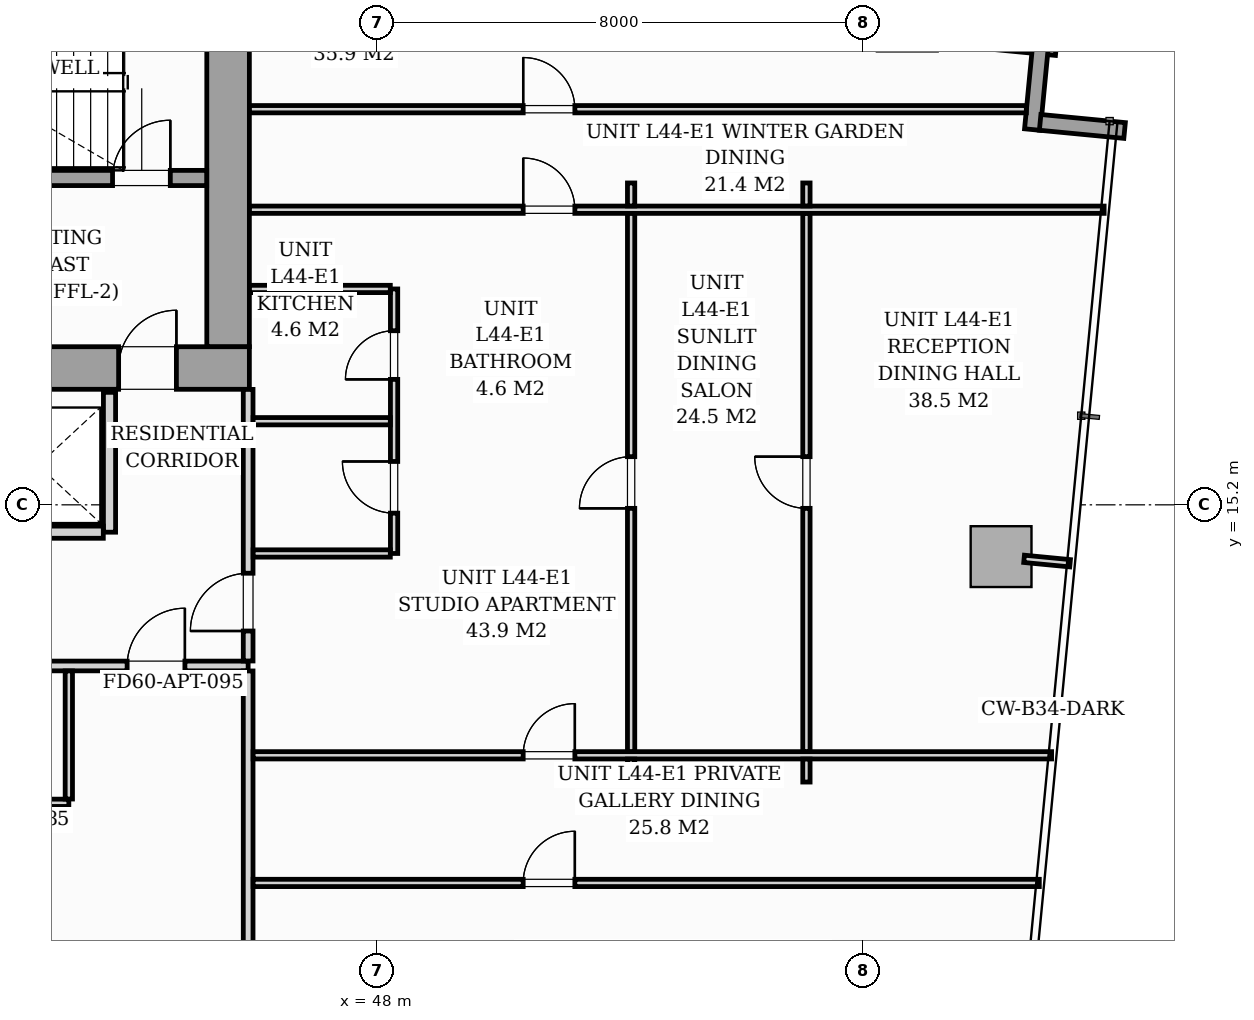
"""IFC4 building model, lengths in metres.
Left out: names, types, materials, properties, quantities, classifications, styles, units other than length and angle.
Written with IfcOpenShell. Run it as: python <this file> out.ifc"""

import sys

from ifc_helpers import new_model, si_unit, direction, frame, frame_2d, origin, origin_2d, place, context, subcontext, project, spatial, rectangle, i_section, extrude, source, transform, mapped, element, fill, save


model = new_model("IFC4")
c1 = context("Model", 3, precision=1e-05, world=origin(), true_north=direction((0.0, 1.0)))
c2 = subcontext(c1, "Body", "Model", "MODEL_VIEW")
j1 = project(units=[si_unit("LENGTHUNIT", "METRE"), si_unit("PLANEANGLEUNIT", "RADIAN")], contexts=[c1])
p1 = place(None, origin())
s1 = spatial("IfcSite", under=j1, at=p1, CompositionType="ELEMENT")
p2 = place(p1, origin())
s2 = spatial("IfcBuilding", under=s1, at=p2, CompositionType="ELEMENT")
p3 = place(p2, frame((0.0, 0.0, 153.4)))
s3 = spatial("IfcBuildingStorey", under=s2, at=p3, CompositionType="ELEMENT", Elevation=153.4)
m1 = source(origin(), c2, "Body", "SweptSolid", [
    extrude(i_section(OverallWidth=0.421, OverallDepth=0.465, WebThickness=0.045, FlangeThickness=0.073, FilletRadius=0.018, at=origin_2d()), origin(), (0.0, 0.0, 1.0), 3.196),
])
p4 = place(p3, frame((45.6, 17.4, 0.002), z_axis=(0.0, 0.0, 1.0), x_axis=(1.0, 0.0, 0.0)))
e1 = element("IfcColumn", 1, at=p4, inside=s3, PredefinedType="PILASTER", context=c2, shape_type="MappedRepresentation", body=[
    mapped(m1, transform((0.0, 0.0, 0.0), scale=1.0)),
])
m2 = source(origin(), c2, "Body", "SweptSolid", [
    extrude(rectangle(XDim=1.0, YDim=1.0, at=origin_2d()), origin(), (0.0, 0.0, 1.0), 3.196),
])
for number, where, z_axis, x_axis in (
    (2, (56.719, 23.157, 0.002), (0.0, 0.0, 1.0), (0.995, -0.096, 0.0)),
    (3, (58.262, 14.348, 0.002), (0.0, 0.0, 1.0), (0.995, -0.096, 0.0)),
):
    element("IfcColumn", number, at=place(p3, frame(where, z_axis=z_axis, x_axis=x_axis)), inside=s3, PredefinedType="COLUMN", context=c2, shape_type="MappedRepresentation", body=[
        mapped(m2, transform((0.0, 0.0, 0.0), scale=1.0)),
    ])
p5 = place(p3, frame((57.2, 22.909, 0.0), z_axis=(0.0, 0.0, 1.0), x_axis=(0.995401789159, -0.095787672171, 0.0)))
e4 = element("IfcWall", 4, at=p5, inside=s3, PredefinedType="STANDARD", context=c2, shape_type="SweptSolid", body=[
    extrude(rectangle(XDim=1.978, YDim=0.26, at=frame_2d((0.989, 0.0))), origin(), (0.0, 0.0, 1.0), 2.94),
])
for number, where, z_axis, x_axis in (
    (5, (58.912, 22.76, 0.0), (0.0, 0.0, 1.0), (-0.096, -0.995, 0.0)),
    (6, (58.905, 21.49, 0.0), (0.0, 0.0, 1.0), (0.995, -0.096, 0.0)),
):
    element("IfcWall", number, at=place(p3, frame(where, z_axis=z_axis, x_axis=x_axis)), inside=s3, PredefinedType="STANDARD", context=c2, shape_type="SweptSolid", body=[
        extrude(rectangle(XDim=1.395, YDim=0.26, at=frame_2d((0.698, 0.0))), origin(), (0.0, 0.0, 1.0), 2.94),
    ])
p6 = place(p3, frame((26.1, 17.45, 0.0), z_axis=(0.0, 0.0, 1.0), x_axis=(1.0, 0.0, 0.0)))
e7 = element("IfcWall", 7, at=p6, inside=s3, PredefinedType="SHEAR", context=c2, shape_type="SweptSolid", body=[
    extrude(rectangle(XDim=19.8, YDim=0.7, at=frame_2d((9.9, 0.0))), origin(), (0.0, 0.0, 1.0), 3.2),
])
p7 = place(p6, frame((1.05, 0.0, 0.0)))
e8 = element("IfcOpeningElement", 8, at=p7, cuts=e7, PredefinedType="OPENING", context=c2, shape_type="SweptSolid", body=[
    extrude(rectangle(XDim=0.95, YDim=2.06, at=frame_2d((0.475, 1.03))), frame((0.0, 0.36, 0.0), z_axis=(0.0, -1.0, 0.0), x_axis=(1.0, 0.0, 0.0)), (0.0, 0.0, 1.0), 0.72),
])
p8 = place(p6, frame((9.48, 0.0, 0.0)))
e9 = element("IfcOpeningElement", 9, at=p8, cuts=e7, PredefinedType="OPENING", context=c2, shape_type="SweptSolid", body=[
    extrude(rectangle(XDim=0.85, YDim=2.0, at=frame_2d((0.425, 1.0))), frame((0.0, 0.36, 0.0), z_axis=(0.0, -1.0, 0.0), x_axis=(1.0, 0.0, 0.0)), (0.0, 0.0, 1.0), 0.72),
])
p9 = place(p6, frame((17.65, 0.0, 0.0)))
e10 = element("IfcOpeningElement", 10, at=p9, cuts=e7, PredefinedType="OPENING", context=c2, shape_type="SweptSolid", body=[
    extrude(rectangle(XDim=0.95, YDim=2.06, at=frame_2d((0.475, 1.03))), frame((0.0, 0.36, 0.0), z_axis=(0.0, -1.0, 0.0), x_axis=(1.0, 0.0, 0.0)), (0.0, 0.0, 1.0), 0.72),
])
p10 = place(p3, frame((45.55, 17.802, 0.0), z_axis=(0.0, 0.0, 1.0), x_axis=(0.0, 1.0, 0.0)))
e11 = element("IfcWall", 11, at=p10, inside=s3, PredefinedType="SHEAR", context=c2, shape_type="SweptSolid", body=[
    extrude(rectangle(XDim=5.796, YDim=0.7, at=frame_2d((2.898, 0.0))), origin(), (0.0, 0.0, 1.0), 3.2),
])
p11 = place(p3, frame((37.05, 20.575, 0.0), z_axis=(0.0, 0.0, 1.0), x_axis=(1.0, 0.0, 0.0)))
e12 = element("IfcWall", 12, at=p11, inside=s3, PredefinedType="SOLIDWALL", context=c2, shape_type="SweptSolid", body=[
    extrude(rectangle(XDim=8.148, YDim=0.25, at=frame_2d((4.074, 0.0))), origin(), (0.0, 0.0, 1.0), 3.2),
])
p12 = place(p11, frame((6.6, 0.0, 0.0)))
e13 = element("IfcOpeningElement", 13, at=p12, cuts=e12, PredefinedType="OPENING", context=c2, shape_type="SweptSolid", body=[
    extrude(rectangle(XDim=0.95, YDim=2.06, at=frame_2d((0.475, 1.03))), frame((0.0, 0.135, 0.0), z_axis=(0.0, -1.0, 0.0), x_axis=(1.0, 0.0, 0.0)), (0.0, 0.0, 1.0), 0.27),
])
p13 = place(p3, frame((43.6, 14.75, 0.0), z_axis=(0.0, 0.0, 1.0), x_axis=(0.0, 1.0, 0.0)))
e14 = element("IfcWall", 14, at=p13, inside=s3, PredefinedType="PARTITIONING", context=c2, shape_type="SweptSolid", body=[
    extrude(rectangle(XDim=2.3, YDim=0.2, at=frame_2d((1.15, 0.0))), origin(), (0.0, 0.0, 1.0), 2.94),
])
p14 = place(p3, frame((41.352, 14.75, 0.0), z_axis=(0.0, 0.0, 1.0), x_axis=(1.0, 0.0, 0.0)))
e15 = element("IfcWall", 15, at=p14, inside=s3, PredefinedType="PARTITIONING", context=c2, shape_type="SweptSolid", body=[
    extrude(rectangle(XDim=2.146, YDim=0.2, at=frame_2d((1.073, 0.0))), origin(), (0.0, 0.0, 1.0), 2.94),
])
p15 = place(p3, frame((22.05, 12.55, 0.0), z_axis=(0.0, 0.0, 1.0), x_axis=(1.0, 0.0, 0.0)))
e16 = element("IfcWall", 16, at=p15, inside=s3, PredefinedType="PARTITIONING", context=c2, shape_type="SweptSolid", body=[
    extrude(rectangle(XDim=23.83, YDim=0.16, at=frame_2d((11.915, 0.0))), origin(), (0.0, 0.0, 1.0), 2.94),
])
p16 = place(p15, frame((1.873, 0.0, 0.0)))
e17 = element("IfcOpeningElement", 17, at=p16, cuts=e16, PredefinedType="OPENING", context=c2, shape_type="SweptSolid", body=[
    extrude(rectangle(XDim=0.95, YDim=2.06, at=frame_2d((0.475, 1.03))), frame((0.0, 0.09, 0.0), z_axis=(0.0, -1.0, 0.0), x_axis=(1.0, 0.0, 0.0)), (0.0, 0.0, 1.0), 0.18),
])
p17 = place(p15, frame((10.224, 0.0, 0.0)))
e18 = element("IfcOpeningElement", 18, at=p17, cuts=e16, PredefinedType="OPENING", context=c2, shape_type="SweptSolid", body=[
    extrude(rectangle(XDim=0.95, YDim=2.06, at=frame_2d((0.475, 1.03))), frame((0.0, 0.09, 0.0), z_axis=(0.0, -1.0, 0.0), x_axis=(1.0, 0.0, 0.0)), (0.0, 0.0, 1.0), 0.18),
])
p18 = place(p15, frame((21.84, 0.0, 0.0)))
e19 = element("IfcOpeningElement", 19, at=p18, cuts=e16, PredefinedType="OPENING", context=c2, shape_type="SweptSolid", body=[
    extrude(rectangle(XDim=0.95, YDim=2.06, at=frame_2d((0.475, 1.03))), frame((0.0, 0.09, 0.0), z_axis=(0.0, -1.0, 0.0), x_axis=(1.0, 0.0, 0.0)), (0.0, 0.0, 1.0), 0.18),
])
p19 = place(p3, frame((45.88, 5.958, 0.0), z_axis=(0.0, 0.0, 1.0), x_axis=(0.0, 1.0, 0.0)))
e20 = element("IfcWall", 20, at=p19, inside=s3, PredefinedType="PARTITIONING", context=c2, shape_type="SweptSolid", body=[
    extrude(rectangle(XDim=6.51, YDim=0.16, at=frame_2d((3.255, 0.0))), origin(), (0.0, 0.0, 1.0), 2.94),
])
p20 = place(p3, frame((45.88, 12.632, 0.0), z_axis=(0.0, 0.0, 1.0), x_axis=(0.0, 1.0, 0.0)))
e21 = element("IfcWall", 21, at=p20, inside=s3, PredefinedType="PARTITIONING", context=c2, shape_type="SweptSolid", body=[
    extrude(rectangle(XDim=4.466, YDim=0.16, at=frame_2d((2.233, 0.0))), origin(), (0.0, 0.0, 1.0), 2.94),
])
p21 = place(p20, frame((0.493, 0.0, 0.0)))
e22 = element("IfcOpeningElement", 22, at=p21, cuts=e21, PredefinedType="OPENING", context=c2, shape_type="SweptSolid", body=[
    extrude(rectangle(XDim=0.95, YDim=2.06, at=frame_2d((0.475, 1.03))), frame((0.0, 0.09, 0.0), z_axis=(0.0, -1.0, 0.0), x_axis=(1.0, 0.0, 0.0)), (0.0, 0.0, 1.0), 0.18),
])
p22 = place(p3, frame((38.931, 10.3, 0.0), z_axis=(0.0, 0.0, 1.0), x_axis=(1.0, 0.0, 0.0)))
e23 = element("IfcWall", 23, at=p22, inside=s3, PredefinedType="PARTITIONING", context=c2, shape_type="SweptSolid", body=[
    extrude(rectangle(XDim=4.0, YDim=0.12, at=frame_2d((2.0, 0.0))), origin(), (0.0, 0.0, 1.0), 2.94),
])
p23 = place(p22, frame((0.45, 0.0, 0.0)))
e24 = element("IfcOpeningElement", 24, at=p23, cuts=e23, PredefinedType="OPENING", context=c2, shape_type="SweptSolid", body=[
    extrude(rectangle(XDim=0.8, YDim=2.02, at=frame_2d((0.4, 1.01))), frame((0.0, 0.07, 0.0), z_axis=(0.0, -1.0, 0.0), x_axis=(1.0, 0.0, 0.0)), (0.0, 0.0, 1.0), 0.14),
])
p24 = place(p22, frame((2.475, 0.0, 0.0)))
e25 = element("IfcOpeningElement", 25, at=p24, cuts=e23, PredefinedType="OPENING", context=c2, shape_type="SweptSolid", body=[
    extrude(rectangle(XDim=0.85, YDim=2.05, at=frame_2d((0.425, 1.025))), frame((0.0, 0.07, 0.0), z_axis=(0.0, -1.0, 0.0), x_axis=(1.0, 0.0, 0.0)), (0.0, 0.0, 1.0), 0.14),
])
p25 = place(p3, frame((42.931, 10.362, 0.0), z_axis=(0.0, 0.0, 1.0), x_axis=(0.0, 1.0, 0.0)))
e26 = element("IfcWall", 26, at=p25, inside=s3, PredefinedType="PARTITIONING", context=c2, shape_type="SweptSolid", body=[
    extrude(rectangle(XDim=2.106, YDim=0.12, at=frame_2d((1.053, 0.0))), origin(), (0.0, 0.0, 1.0), 2.94),
])
p26 = place(p3, frame((48.28, 14.4, 0.0), z_axis=(0.0, 0.0, 1.0), x_axis=(0.0, 1.0, 0.0)))
e27 = element("IfcWall", 27, at=p26, inside=s3, PredefinedType="PARTITIONING", context=c2, shape_type="SweptSolid", body=[
    extrude(rectangle(XDim=4.35, YDim=0.12, at=frame_2d((2.175, 0.0))), origin(), (0.0, 0.0, 1.0), 2.94),
])
p27 = place(p26, frame((0.663, 0.0, 0.0)))
e28 = element("IfcOpeningElement", 28, at=p27, cuts=e27, PredefinedType="OPENING", context=c2, shape_type="SweptSolid", body=[
    extrude(rectangle(XDim=0.85, YDim=2.05, at=frame_2d((0.425, 1.025))), frame((0.0, 0.07, 0.0), z_axis=(0.0, -1.0, 0.0), x_axis=(1.0, 0.0, 0.0)), (0.0, 0.0, 1.0), 0.14),
])
p28 = place(p26, frame((2.863, 0.0, 0.0)))
e29 = element("IfcOpeningElement", 29, at=p28, cuts=e27, PredefinedType="OPENING", context=c2, shape_type="SweptSolid", body=[
    extrude(rectangle(XDim=0.8, YDim=2.02, at=frame_2d((0.4, 1.01))), frame((0.0, 0.07, 0.0), z_axis=(0.0, -1.0, 0.0), x_axis=(1.0, 0.0, 0.0)), (0.0, 0.0, 1.0), 0.14),
])
for number, where, z_axis, x_axis in (
    (30, (45.962, 16.575, 0.0), (0.0, 0.0, 1.0), (1.0, 0.0, 0.0)),
    (31, (45.962, 14.4, 0.0), (0.0, 0.0, 1.0), (1.0, 0.0, 0.0)),
):
    element("IfcWall", number, at=place(p3, frame(where, z_axis=z_axis, x_axis=x_axis)), inside=s3, PredefinedType="PARTITIONING", context=c2, shape_type="SweptSolid", body=[
        extrude(rectangle(XDim=2.256, YDim=0.12, at=frame_2d((1.128, 0.0))), origin(), (0.0, 0.0, 1.0), 2.94),
    ])
p29 = place(p3, frame((45.902, 18.75, 0.0), z_axis=(0.0, 0.0, 1.0), x_axis=(1.0, 0.0, 0.0)))
e32 = element("IfcWall", 32, at=p29, inside=s3, PredefinedType="PARTITIONING", context=c2, shape_type="SweptSolid", body=[
    extrude(rectangle(XDim=2.316, YDim=0.12, at=frame_2d((1.158, 0.0))), origin(), (0.0, 0.0, 1.0), 2.94),
])
p30 = place(p3, frame((45.962, 8.982, 0.0), z_axis=(0.0, 0.0, 1.0), x_axis=(1.0, 0.0, 0.0)))
e33 = element("IfcWall", 33, at=p30, inside=s3, PredefinedType="PARTITIONING", context=c2, shape_type="SweptSolid", body=[
    extrude(rectangle(XDim=12.929, YDim=0.12, at=frame_2d((6.464, 0.0))), origin(), (0.0, 0.0, 1.0), 2.94),
])
p31 = place(p30, frame((4.441, 0.0, 0.0)))
e34 = element("IfcOpeningElement", 34, at=p31, cuts=e33, PredefinedType="OPENING", context=c2, shape_type="SweptSolid", body=[
    extrude(rectangle(XDim=0.85, YDim=2.05, at=frame_2d((0.425, 1.025))), frame((0.0, 0.07, 0.0), z_axis=(0.0, -1.0, 0.0), x_axis=(1.0, 0.0, 0.0)), (0.0, 0.0, 1.0), 0.14),
])
p32 = place(p3, frame((45.902, 21.706, 0.0), z_axis=(0.0, 0.0, 1.0), x_axis=(1.0, 0.0, 0.0)))
e35 = element("IfcWall", 35, at=p32, inside=s3, PredefinedType="PARTITIONING", context=c2, shape_type="SweptSolid", body=[
    extrude(rectangle(XDim=12.775, YDim=0.12, at=frame_2d((6.388, 0.0))), origin(), (0.0, 0.0, 1.0), 2.94),
])
p33 = place(p32, frame((4.501, 0.0, 0.0)))
e36 = element("IfcOpeningElement", 36, at=p33, cuts=e35, PredefinedType="OPENING", context=c2, shape_type="SweptSolid", body=[
    extrude(rectangle(XDim=0.85, YDim=2.05, at=frame_2d((0.425, 1.025))), frame((0.0, 0.07, 0.0), z_axis=(0.0, -1.0, 0.0), x_axis=(1.0, 0.0, 0.0)), (0.0, 0.0, 1.0), 0.14),
])
p34 = place(p3, frame((45.962, 11.081, 0.0), z_axis=(0.0, 0.0, 1.0), x_axis=(1.0, 0.0, 0.0)))
e37 = element("IfcWall", 37, at=p34, inside=s3, PredefinedType="PARTITIONING", context=c2, shape_type="SweptSolid", body=[
    extrude(rectangle(XDim=13.131, YDim=0.12, at=frame_2d((6.565, 0.0))), origin(), (0.0, 0.0, 1.0), 2.94),
])
p35 = place(p34, frame((4.441, 0.0, 0.0)))
e38 = element("IfcOpeningElement", 38, at=p35, cuts=e37, PredefinedType="OPENING", context=c2, shape_type="SweptSolid", body=[
    extrude(rectangle(XDim=0.85, YDim=2.05, at=frame_2d((0.425, 1.025))), frame((0.0, 0.07, 0.0), z_axis=(0.0, -1.0, 0.0), x_axis=(1.0, 0.0, 0.0)), (0.0, 0.0, 1.0), 0.14),
])
p36 = place(p3, frame((45.902, 20.053, 0.0), z_axis=(0.0, 0.0, 1.0), x_axis=(1.0, 0.0, 0.0)))
e39 = element("IfcWall", 39, at=p36, inside=s3, PredefinedType="PARTITIONING", context=c2, shape_type="SweptSolid", body=[
    extrude(rectangle(XDim=14.055, YDim=0.12, at=frame_2d((7.027, 0.0))), origin(), (0.0, 0.0, 1.0), 2.94),
])
p37 = place(p36, frame((4.501, 0.0, 0.0)))
e40 = element("IfcOpeningElement", 40, at=p37, cuts=e39, PredefinedType="OPENING", context=c2, shape_type="SweptSolid", body=[
    extrude(rectangle(XDim=0.85, YDim=2.05, at=frame_2d((0.425, 1.025))), frame((0.0, 0.07, 0.0), z_axis=(0.0, -1.0, 0.0), x_axis=(1.0, 0.0, 0.0)), (0.0, 0.0, 1.0), 0.14),
])
p38 = place(p3, frame((55.061, 10.641, 0.0), z_axis=(0.0, 0.0, 1.0), x_axis=(0.0, 1.0, 0.0)))
e41 = element("IfcWall", 41, at=p38, inside=s3, PredefinedType="PARTITIONING", context=c2, shape_type="SweptSolid", body=[
    extrude(rectangle(XDim=0.378, YDim=0.12, at=frame_2d((0.189, 0.0))), origin(), (0.0, 0.0, 1.0), 2.94),
])
p39 = place(p3, frame((55.061, 11.143, 0.0), z_axis=(0.0, 0.0, 1.0), x_axis=(0.0, 1.0, 0.0)))
e42 = element("IfcWall", 42, at=p39, inside=s3, PredefinedType="PARTITIONING", context=c2, shape_type="SweptSolid", body=[
    extrude(rectangle(XDim=8.848, YDim=0.12, at=frame_2d((4.424, 0.0))), origin(), (0.0, 0.0, 1.0), 2.94),
])
p40 = place(p39, frame((3.999, 0.0, 0.0)))
e43 = element("IfcOpeningElement", 43, at=p40, cuts=e42, PredefinedType="OPENING", context=c2, shape_type="SweptSolid", body=[
    extrude(rectangle(XDim=0.85, YDim=2.05, at=frame_2d((0.425, 1.025))), frame((0.0, 0.07, 0.0), z_axis=(0.0, -1.0, 0.0), x_axis=(1.0, 0.0, 0.0)), (0.0, 0.0, 1.0), 0.14),
])
for number, where, z_axis, x_axis in (
    (44, (55.061, 20.115, 0.0), (0.0, 0.0, 1.0), (0.0, 1.0, 0.0)),
    (45, (52.178, 10.641, 0.0), (0.0, 0.0, 1.0), (0.0, 1.0, 0.0)),
):
    element("IfcWall", number, at=place(p3, frame(where, z_axis=z_axis, x_axis=x_axis)), inside=s3, PredefinedType="PARTITIONING", context=c2, shape_type="SweptSolid", body=[
        extrude(rectangle(XDim=0.378, YDim=0.12, at=frame_2d((0.189, 0.0))), origin(), (0.0, 0.0, 1.0), 2.94),
    ])
p41 = place(p3, frame((52.178, 11.143, 0.0), z_axis=(0.0, 0.0, 1.0), x_axis=(0.0, 1.0, 0.0)))
e46 = element("IfcWall", 46, at=p41, inside=s3, PredefinedType="PARTITIONING", context=c2, shape_type="SweptSolid", body=[
    extrude(rectangle(XDim=8.848, YDim=0.12, at=frame_2d((4.424, 0.0))), origin(), (0.0, 0.0, 1.0), 2.94),
])
p42 = place(p41, frame((3.999, 0.0, 0.0)))
e47 = element("IfcOpeningElement", 47, at=p42, cuts=e46, PredefinedType="OPENING", context=c2, shape_type="SweptSolid", body=[
    extrude(rectangle(XDim=0.85, YDim=2.05, at=frame_2d((0.425, 1.025))), frame((0.0, 0.07, 0.0), z_axis=(0.0, -1.0, 0.0), x_axis=(1.0, 0.0, 0.0)), (0.0, 0.0, 1.0), 0.14),
])
p43 = place(p3, frame((52.178, 20.115, 0.0), z_axis=(0.0, 0.0, 1.0), x_axis=(0.0, 1.0, 0.0)))
e48 = element("IfcWall", 48, at=p43, inside=s3, PredefinedType="PARTITIONING", context=c2, shape_type="SweptSolid", body=[
    extrude(rectangle(XDim=0.378, YDim=0.12, at=frame_2d((0.189, 0.0))), origin(), (0.0, 0.0, 1.0), 2.94),
])
p44 = place(p3, frame((58.64, 14.312, 0.0), z_axis=(0.0, 0.0, 1.0), x_axis=(0.995377786728, -0.096036772582, 0.0)))
e49 = element("IfcWall", 49, at=p44, inside=s3, PredefinedType="PARTITIONING", context=c2, shape_type="SweptSolid", body=[
    extrude(rectangle(XDim=0.76, YDim=0.12, at=frame_2d((0.38, 0.0))), origin(), (0.0, 0.0, 1.0), 2.94),
])
m3 = source(origin(), c2, "Body", "SweptSolid", [
    extrude(rectangle(XDim=0.95, YDim=2.06, at=frame_2d((0.475, 1.03))), frame((0.0, 0.025, 0.0), z_axis=(0.0, -1.0, 0.0), x_axis=(1.0, 0.0, 0.0)), (0.0, 0.0, 1.0), 0.05),
])
p45 = place(p9, origin())
e50 = element("IfcDoor", 50, at=p45, inside=s3, OperationType="SINGLE_SWING_RIGHT", PredefinedType="DOOR", context=c2, shape_type="MappedRepresentation", body=[
    mapped(m3, transform((0.0, 0.0, 0.0), scale=1.0)),
])
fill(e10, e50)
p46 = place(p12, origin())
e51 = element("IfcDoor", 51, at=p46, inside=s3, OperationType="SINGLE_SWING_RIGHT", PredefinedType="DOOR", context=c2, shape_type="MappedRepresentation", body=[
    mapped(m3, transform((0.0, 0.0, 0.0), scale=1.0)),
])
fill(e13, e51)
m4 = source(origin(), c2, "Body", "SweptSolid", [
    extrude(rectangle(XDim=0.95, YDim=2.06, at=frame_2d((0.475, 1.03))), frame((0.0, 0.025, 0.0), z_axis=(0.0, -1.0, 0.0), x_axis=(1.0, 0.0, 0.0)), (0.0, 0.0, 1.0), 0.05),
])
p47 = place(p18, origin())
e52 = element("IfcDoor", 52, at=p47, inside=s3, OperationType="SINGLE_SWING_RIGHT", PredefinedType="DOOR", context=c2, shape_type="MappedRepresentation", body=[
    mapped(m4, transform((0.0, 0.0, 0.0), scale=1.0)),
])
fill(e19, e52)
p48 = place(p21, origin())
e53 = element("IfcDoor", 53, at=p48, inside=s3, OperationType="SINGLE_SWING_LEFT", PredefinedType="DOOR", context=c2, shape_type="MappedRepresentation", body=[
    mapped(m4, transform((0.0, 0.0, 0.0), scale=1.0)),
])
fill(e22, e53)
m5 = source(origin(), c2, "Body", "SweptSolid", [
    extrude(rectangle(XDim=0.85, YDim=2.05, at=frame_2d((0.425, 1.025))), frame((0.0, 0.025, 0.0), z_axis=(0.0, -1.0, 0.0), x_axis=(1.0, 0.0, 0.0)), (0.0, 0.0, 1.0), 0.05),
])
p49 = place(p27, origin())
e54 = element("IfcDoor", 54, at=p49, inside=s3, OperationType="SINGLE_SWING_RIGHT", PredefinedType="DOOR", context=c2, shape_type="MappedRepresentation", body=[
    mapped(m5, transform((0.0, 0.0, 0.0), scale=1.0)),
])
fill(e28, e54)
m6 = source(origin(), c2, "Body", "SweptSolid", [
    extrude(rectangle(XDim=0.8, YDim=2.02, at=frame_2d((0.4, 1.01))), frame((0.0, 0.025, 0.0), z_axis=(0.0, -1.0, 0.0), x_axis=(1.0, 0.0, 0.0)), (0.0, 0.0, 1.0), 0.05),
])
p50 = place(p28, origin())
e55 = element("IfcDoor", 55, at=p50, inside=s3, OperationType="SINGLE_SWING_LEFT", PredefinedType="DOOR", context=c2, shape_type="MappedRepresentation", body=[
    mapped(m6, transform((0.0, 0.0, 0.0), scale=1.0)),
])
fill(e29, e55)
p51 = place(p31, origin())
e56 = element("IfcDoor", 56, at=p51, inside=s3, OperationType="SINGLE_SWING_RIGHT", PredefinedType="DOOR", context=c2, shape_type="MappedRepresentation", body=[
    mapped(m5, transform((0.0, 0.0, 0.0), scale=1.0)),
])
fill(e34, e56)
p52 = place(p33, origin())
e57 = element("IfcDoor", 57, at=p52, inside=s3, OperationType="SINGLE_SWING_LEFT", PredefinedType="DOOR", context=c2, shape_type="MappedRepresentation", body=[
    mapped(m5, transform((0.0, 0.0, 0.0), scale=1.0)),
])
fill(e36, e57)
p53 = place(p35, origin())
e58 = element("IfcDoor", 58, at=p53, inside=s3, OperationType="SINGLE_SWING_RIGHT", PredefinedType="DOOR", context=c2, shape_type="MappedRepresentation", body=[
    mapped(m5, transform((0.0, 0.0, 0.0), scale=1.0)),
])
fill(e38, e58)
p54 = place(p37, origin())
e59 = element("IfcDoor", 59, at=p54, inside=s3, OperationType="SINGLE_SWING_LEFT", PredefinedType="DOOR", context=c2, shape_type="MappedRepresentation", body=[
    mapped(m5, transform((0.0, 0.0, 0.0), scale=1.0)),
])
fill(e40, e59)
p55 = place(p40, origin())
e60 = element("IfcDoor", 60, at=p55, inside=s3, OperationType="SINGLE_SWING_RIGHT", PredefinedType="DOOR", context=c2, shape_type="MappedRepresentation", body=[
    mapped(m5, transform((0.0, 0.0, 0.0), scale=1.0)),
])
fill(e43, e60)
p56 = place(p42, origin())
e61 = element("IfcDoor", 61, at=p56, inside=s3, OperationType="SINGLE_SWING_LEFT", PredefinedType="DOOR", context=c2, shape_type="MappedRepresentation", body=[
    mapped(m5, transform((0.0, 0.0, 0.0), scale=1.0)),
])
fill(e47, e61)
save(model, sys.argv[1])
